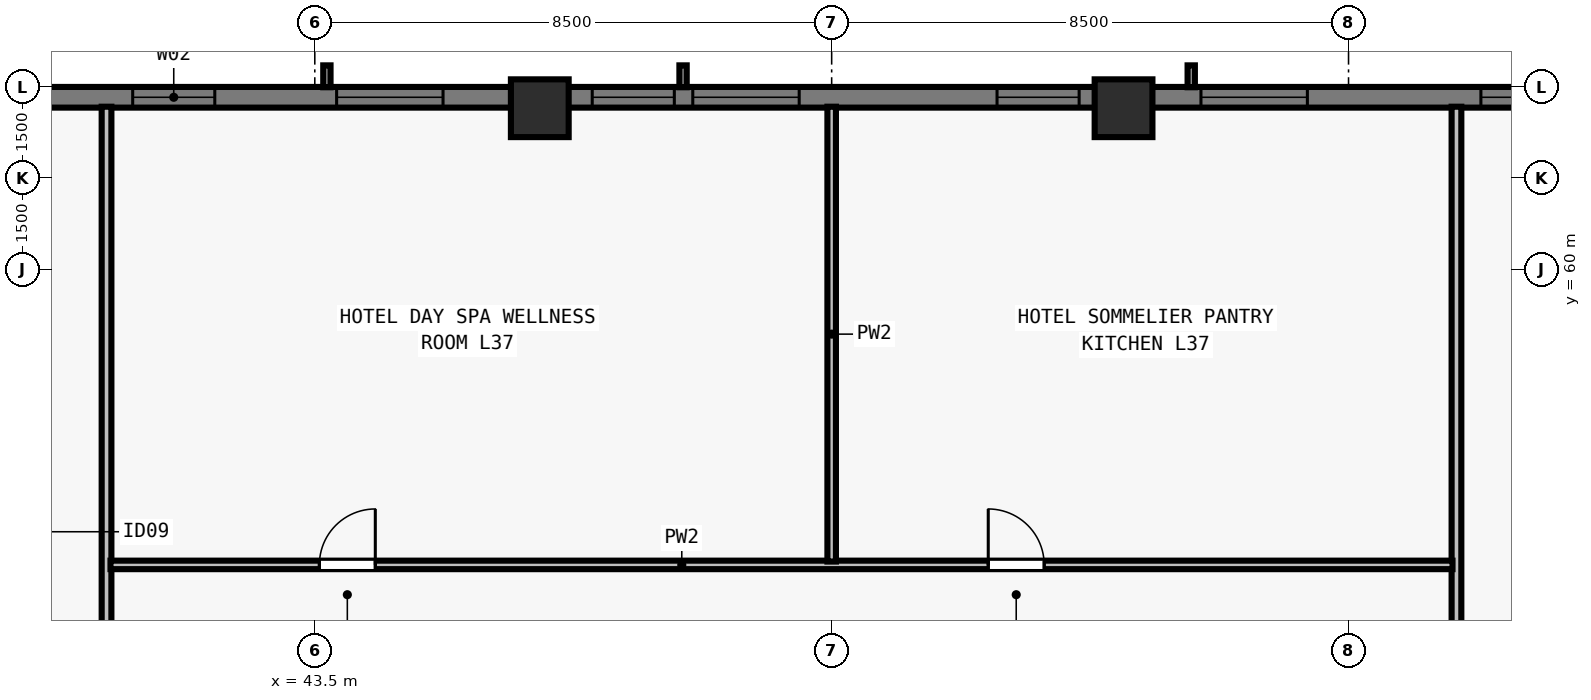
"""IFC4 building model, lengths in metres.
Left out: names, types, materials, properties, quantities, classifications, styles, units other than length and angle.
Written with IfcOpenShell. Run it as: python <this file> out.ifc"""

import sys

from ifc_helpers import new_model, si_unit, direction, frame, frame_2d, origin, origin_2d, place, context, subcontext, project, spatial, rectangle, extrude, element, fill, save


model = new_model("IFC4")
c1 = context("Model", 3, precision=1e-05, world=origin(), true_north=direction((0.0, 1.0)))
c2 = subcontext(c1, "Body", "Model", "MODEL_VIEW")
j1 = project(units=[si_unit("LENGTHUNIT", "METRE"), si_unit("PLANEANGLEUNIT", "RADIAN")], contexts=[c1])
p1 = place(None, origin())
s1 = spatial("IfcSite", under=j1, at=p1, CompositionType="ELEMENT")
p2 = place(p1, origin())
s2 = spatial("IfcBuilding", under=s1, at=p2, CompositionType="ELEMENT")
p3 = place(p2, frame((0.0, 0.0, 137.5)))
s3 = spatial("IfcBuildingStorey", under=s2, at=p3, CompositionType="ELEMENT", Elevation=137.5)
for number, where, z_axis, x_axis in (
    (1, (56.8, 62.65, 0.0), (0.0, 0.0, 1.0), (1.0, 0.0, 0.0)),
    (2, (47.2, 62.65, 0.0), (0.0, 0.0, 1.0), (1.0, 0.0, 0.0)),
):
    element("IfcColumn", number, at=place(p3, frame(where, z_axis=z_axis, x_axis=x_axis)), inside=s3, PredefinedType="COLUMN", context=c2, shape_type="SweptSolid", body=[
        extrude(rectangle(XDim=0.95, YDim=0.95, at=origin_2d()), origin(), (0.0, 0.0, 1.0), 3.5),
    ])
p4 = place(p3, frame((32.0, 62.83, 0.0), z_axis=(0.0, 0.0, 1.0), x_axis=(1.0, 0.0, 0.0)))
e3 = element("IfcWall", 3, at=p4, inside=s3, PredefinedType="SOLIDWALL", context=c2, shape_type="SweptSolid", body=[
    extrude(rectangle(XDim=39.682, YDim=0.34, at=frame_2d((19.841, 0.0))), origin(), (0.0, 0.0, 1.0), 3.28),
])
p5 = place(p4, frame((3.902, 0.0, 0.8)))
e4 = element("IfcOpeningElement", 4, at=p5, cuts=e3, PredefinedType="OPENING", context=c2, shape_type="SweptSolid", body=[
    extrude(rectangle(XDim=1.75, YDim=1.66, at=frame_2d((0.875, 0.83))), frame((0.0, 0.18, 0.0), z_axis=(0.0, -1.0, 0.0), x_axis=(1.0, 0.0, 0.0)), (0.0, 0.0, 1.0), 0.36),
])
p6 = place(p4, frame((8.505, 0.0, 0.8)))
e5 = element("IfcOpeningElement", 5, at=p6, cuts=e3, PredefinedType="OPENING", context=c2, shape_type="SweptSolid", body=[
    extrude(rectangle(XDim=1.35, YDim=1.66, at=frame_2d((0.675, 0.83))), frame((0.0, 0.18, 0.0), z_axis=(0.0, -1.0, 0.0), x_axis=(1.0, 0.0, 0.0)), (0.0, 0.0, 1.0), 0.36),
])
p7 = place(p4, frame((11.859, 0.0, 0.8)))
e6 = element("IfcOpeningElement", 6, at=p7, cuts=e3, PredefinedType="OPENING", context=c2, shape_type="SweptSolid", body=[
    extrude(rectangle(XDim=1.75, YDim=1.66, at=frame_2d((0.875, 0.83))), frame((0.0, 0.18, 0.0), z_axis=(0.0, -1.0, 0.0), x_axis=(1.0, 0.0, 0.0)), (0.0, 0.0, 1.0), 0.36),
])
p8 = place(p4, frame((16.062, 0.0, 0.8)))
e7 = element("IfcOpeningElement", 7, at=p8, cuts=e3, PredefinedType="OPENING", context=c2, shape_type="SweptSolid", body=[
    extrude(rectangle(XDim=1.35, YDim=1.66, at=frame_2d((0.675, 0.83))), frame((0.0, 0.18, 0.0), z_axis=(0.0, -1.0, 0.0), x_axis=(1.0, 0.0, 0.0)), (0.0, 0.0, 1.0), 0.36),
])
p9 = place(p4, frame((17.716, 0.0, 0.8)))
e8 = element("IfcOpeningElement", 8, at=p9, cuts=e3, PredefinedType="OPENING", context=c2, shape_type="SweptSolid", body=[
    extrude(rectangle(XDim=1.75, YDim=1.66, at=frame_2d((0.875, 0.83))), frame((0.0, 0.18, 0.0), z_axis=(0.0, -1.0, 0.0), x_axis=(1.0, 0.0, 0.0)), (0.0, 0.0, 1.0), 0.36),
])
p10 = place(p4, frame((22.719, 0.0, 0.8)))
e9 = element("IfcOpeningElement", 9, at=p10, cuts=e3, PredefinedType="OPENING", context=c2, shape_type="SweptSolid", body=[
    extrude(rectangle(XDim=1.35, YDim=1.66, at=frame_2d((0.675, 0.83))), frame((0.0, 0.18, 0.0), z_axis=(0.0, -1.0, 0.0), x_axis=(1.0, 0.0, 0.0)), (0.0, 0.0, 1.0), 0.36),
])
p11 = place(p4, frame((26.073, 0.0, 0.8)))
e10 = element("IfcOpeningElement", 10, at=p11, cuts=e3, PredefinedType="OPENING", context=c2, shape_type="SweptSolid", body=[
    extrude(rectangle(XDim=1.75, YDim=1.66, at=frame_2d((0.875, 0.83))), frame((0.0, 0.18, 0.0), z_axis=(0.0, -1.0, 0.0), x_axis=(1.0, 0.0, 0.0)), (0.0, 0.0, 1.0), 0.36),
])
p12 = place(p4, frame((30.677, 0.0, 0.8)))
e11 = element("IfcOpeningElement", 11, at=p12, cuts=e3, PredefinedType="OPENING", context=c2, shape_type="SweptSolid", body=[
    extrude(rectangle(XDim=1.35, YDim=1.66, at=frame_2d((0.675, 0.83))), frame((0.0, 0.18, 0.0), z_axis=(0.0, -1.0, 0.0), x_axis=(1.0, 0.0, 0.0)), (0.0, 0.0, 1.0), 0.36),
])
p13 = place(p4, frame((33.18, 0.0, 0.8)))
e12 = element("IfcOpeningElement", 12, at=p13, cuts=e3, PredefinedType="OPENING", context=c2, shape_type="SweptSolid", body=[
    extrude(rectangle(XDim=1.75, YDim=1.66, at=frame_2d((0.875, 0.83))), frame((0.0, 0.18, 0.0), z_axis=(0.0, -1.0, 0.0), x_axis=(1.0, 0.0, 0.0)), (0.0, 0.0, 1.0), 0.36),
])
p14 = place(p3, frame((40.075, 47.6, 0.0), z_axis=(0.0, 0.0, 1.0), x_axis=(0.0, 1.0, 0.0)))
e13 = element("IfcWall", 13, at=p14, inside=s3, PredefinedType="PARTITIONING", context=c2, shape_type="SweptSolid", body=[
    extrude(rectangle(XDim=15.075, YDim=0.16, at=frame_2d((7.538, 0.0))), origin(), (0.0, 0.0, 1.0), 2.555),
])
p15 = place(p14, frame((1.8, 0.0, 0.0)))
e14 = element("IfcOpeningElement", 14, at=p15, cuts=e13, PredefinedType="OPENING", context=c2, shape_type="SweptSolid", body=[
    extrude(rectangle(XDim=0.96, YDim=2.12, at=frame_2d((0.48, 1.06))), frame((0.0, 0.09, 0.0), z_axis=(0.0, -1.0, 0.0), x_axis=(1.0, 0.0, 0.0)), (0.0, 0.0, 1.0), 0.18),
])
p16 = place(p3, frame((62.275, 47.6, 0.0), z_axis=(0.0, 0.0, 1.0), x_axis=(0.0, 1.0, 0.0)))
e15 = element("IfcWall", 15, at=p16, inside=s3, PredefinedType="PARTITIONING", context=c2, shape_type="SweptSolid", body=[
    extrude(rectangle(XDim=15.075, YDim=0.16, at=frame_2d((7.538, 0.0))), origin(), (0.0, 0.0, 1.0), 2.555),
])
p17 = place(p3, frame((40.14, 55.14, 0.0), z_axis=(0.0, 0.0, 1.0), x_axis=(1.0, 0.0, 0.0)))
e16 = element("IfcWall", 16, at=p17, inside=s3, PredefinedType="PARTITIONING", context=c2, shape_type="SweptSolid", body=[
    extrude(rectangle(XDim=22.07, YDim=0.14, at=frame_2d((11.035, 0.0))), origin(), (0.0, 0.0, 1.0), 3.28),
])
p18 = place(p17, frame((3.435, 0.0, 0.0)))
e17 = element("IfcOpeningElement", 17, at=p18, cuts=e16, PredefinedType="OPENING", context=c2, shape_type="SweptSolid", body=[
    extrude(rectangle(XDim=0.92, YDim=2.12, at=frame_2d((0.46, 1.06))), frame((0.0, 0.08, 0.0), z_axis=(0.0, -1.0, 0.0), x_axis=(1.0, 0.0, 0.0)), (0.0, 0.0, 1.0), 0.16),
])
p19 = place(p17, frame((14.435, 0.0, 0.0)))
e18 = element("IfcOpeningElement", 18, at=p19, cuts=e16, PredefinedType="OPENING", context=c2, shape_type="SweptSolid", body=[
    extrude(rectangle(XDim=0.92, YDim=2.12, at=frame_2d((0.46, 1.06))), frame((0.0, 0.08, 0.0), z_axis=(0.0, -1.0, 0.0), x_axis=(1.0, 0.0, 0.0)), (0.0, 0.0, 1.0), 0.16),
])
p20 = place(p3, frame((52.0, 55.195, 0.0), z_axis=(0.0, 0.0, 1.0), x_axis=(0.0, 1.0, 0.0)))
e19 = element("IfcWall", 19, at=p20, inside=s3, PredefinedType="PARTITIONING", context=c2, shape_type="SweptSolid", body=[
    extrude(rectangle(XDim=7.48, YDim=0.14, at=frame_2d((3.74, 0.0))), origin(), (0.0, 0.0, 1.0), 3.28),
])
p21 = place(p6, origin())
e20 = element("IfcWindow", 20, at=p21, inside=s3, PartitioningType="SINGLE_PANEL", PredefinedType="WINDOW", context=c2, shape_type="SweptSolid", body=[
    extrude(rectangle(XDim=1.35, YDim=1.66, at=frame_2d((0.675, 0.83))), frame((0.0, -0.05, 0.0), z_axis=(0.0, -1.0, 0.0), x_axis=(1.0, 0.0, 0.0)), (0.0, 0.0, 1.0), 0.06),
])
fill(e5, e20)
p22 = place(p7, origin())
e21 = element("IfcWindow", 21, at=p22, inside=s3, PartitioningType="SINGLE_PANEL", PredefinedType="WINDOW", context=c2, shape_type="SweptSolid", body=[
    extrude(rectangle(XDim=1.75, YDim=1.66, at=frame_2d((0.875, 0.83))), frame((0.0, -0.05, 0.0), z_axis=(0.0, -1.0, 0.0), x_axis=(1.0, 0.0, 0.0)), (0.0, 0.0, 1.0), 0.06),
])
fill(e6, e21)
p23 = place(p8, origin())
e22 = element("IfcWindow", 22, at=p23, inside=s3, PartitioningType="SINGLE_PANEL", PredefinedType="WINDOW", context=c2, shape_type="SweptSolid", body=[
    extrude(rectangle(XDim=1.35, YDim=1.66, at=frame_2d((0.675, 0.83))), frame((0.0, -0.05, 0.0), z_axis=(0.0, -1.0, 0.0), x_axis=(1.0, 0.0, 0.0)), (0.0, 0.0, 1.0), 0.06),
])
fill(e7, e22)
p24 = place(p9, origin())
e23 = element("IfcWindow", 23, at=p24, inside=s3, PartitioningType="SINGLE_PANEL", PredefinedType="WINDOW", context=c2, shape_type="SweptSolid", body=[
    extrude(rectangle(XDim=1.75, YDim=1.66, at=frame_2d((0.875, 0.83))), frame((0.0, -0.05, 0.0), z_axis=(0.0, -1.0, 0.0), x_axis=(1.0, 0.0, 0.0)), (0.0, 0.0, 1.0), 0.06),
])
fill(e8, e23)
p25 = place(p10, origin())
e24 = element("IfcWindow", 24, at=p25, inside=s3, PartitioningType="SINGLE_PANEL", PredefinedType="WINDOW", context=c2, shape_type="SweptSolid", body=[
    extrude(rectangle(XDim=1.35, YDim=1.66, at=frame_2d((0.675, 0.83))), frame((0.0, -0.05, 0.0), z_axis=(0.0, -1.0, 0.0), x_axis=(1.0, 0.0, 0.0)), (0.0, 0.0, 1.0), 0.06),
])
fill(e9, e24)
p26 = place(p11, origin())
e25 = element("IfcWindow", 25, at=p26, inside=s3, PartitioningType="SINGLE_PANEL", PredefinedType="WINDOW", context=c2, shape_type="SweptSolid", body=[
    extrude(rectangle(XDim=1.75, YDim=1.66, at=frame_2d((0.875, 0.83))), frame((0.0, -0.05, 0.0), z_axis=(0.0, -1.0, 0.0), x_axis=(1.0, 0.0, 0.0)), (0.0, 0.0, 1.0), 0.06),
])
fill(e10, e25)
p27 = place(p12, origin())
e26 = element("IfcWindow", 26, at=p27, inside=s3, PartitioningType="SINGLE_PANEL", PredefinedType="WINDOW", context=c2, shape_type="SweptSolid", body=[
    extrude(rectangle(XDim=1.35, YDim=1.66, at=frame_2d((0.675, 0.83))), frame((0.0, -0.05, 0.0), z_axis=(0.0, -1.0, 0.0), x_axis=(1.0, 0.0, 0.0)), (0.0, 0.0, 1.0), 0.06),
])
fill(e11, e26)
p28 = place(p18, origin())
e27 = element("IfcDoor", 27, at=p28, inside=s3, OperationType="SINGLE_SWING_RIGHT", PredefinedType="DOOR", context=c2, shape_type="SweptSolid", body=[
    extrude(rectangle(XDim=0.92, YDim=2.12, at=frame_2d((0.46, 1.06))), frame((0.0, 0.025, 0.0), z_axis=(0.0, -1.0, 0.0), x_axis=(1.0, 0.0, 0.0)), (0.0, 0.0, 1.0), 0.05),
])
fill(e17, e27)
p29 = place(p19, origin())
e28 = element("IfcDoor", 28, at=p29, inside=s3, OperationType="SINGLE_SWING_LEFT", PredefinedType="DOOR", context=c2, shape_type="SweptSolid", body=[
    extrude(rectangle(XDim=0.92, YDim=2.12, at=frame_2d((0.46, 1.06))), frame((0.0, 0.025, 0.0), z_axis=(0.0, -1.0, 0.0), x_axis=(1.0, 0.0, 0.0)), (0.0, 0.0, 1.0), 0.05),
])
fill(e18, e28)
save(model, sys.argv[1])
